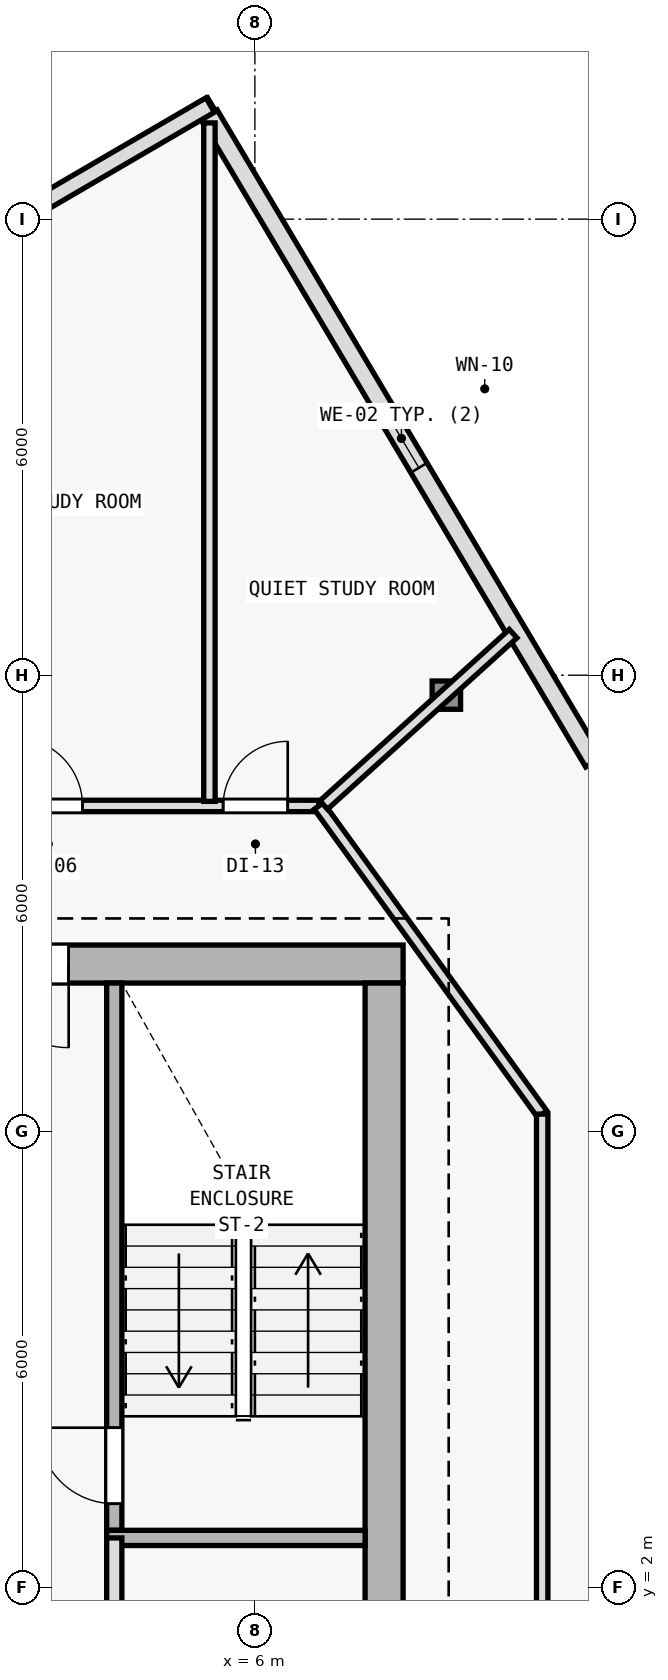
"""IFC4 building model, lengths in metres.
Left out: names, types, materials, properties, quantities, classifications, styles, units other than length and angle.
Written with IfcOpenShell. Run it as: python <this file> out.ifc"""

import sys

from ifc_helpers import new_model, si_unit, direction, frame, frame_2d, origin, origin_2d, place, context, subcontext, project, spatial, rectangle, i_section, extrude, element, fill, save


model = new_model("IFC4")
c1 = context("Model", 3, precision=1e-05, world=origin(), true_north=direction((0.0, 1.0)))
c2 = subcontext(c1, "Body", "Model", "MODEL_VIEW")
j1 = project(units=[si_unit("LENGTHUNIT", "METRE"), si_unit("PLANEANGLEUNIT", "RADIAN")], contexts=[c1])
p1 = place(None, origin())
s1 = spatial("IfcSite", under=j1, at=p1, CompositionType="ELEMENT")
p2 = place(p1, origin())
s2 = spatial("IfcBuilding", under=s1, at=p2, CompositionType="ELEMENT")
p3 = place(p2, frame((0.0, 0.0, 234.3)))
s3 = spatial("IfcBuildingStorey", under=s2, at=p3, CompositionType="ELEMENT", Elevation=234.3)
p4 = place(p3, frame((7.7, 10.2, 0.0), z_axis=(0.0, 0.0, 1.0), x_axis=(1.0, 0.0, 0.0)))
e1 = element("IfcColumn", 1, at=p4, inside=s3, PredefinedType="COLUMN", context=c2, shape_type="SweptSolid", body=[
    extrude(i_section(OverallWidth=0.398, OverallDepth=0.387, WebThickness=0.013, FlangeThickness=0.022, FilletRadius=0.015, at=origin_2d()), origin(), (0.0, 0.0, 1.0), 3.6),
])
p5 = place(p3, frame((8.519, 13.738, 0.005), z_axis=(-0.011699044583, -0.00258467264, 0.999928223336), x_axis=(0.215728093413, -0.976453475447, 0.0)))
e2 = element("IfcColumn", 2, at=p5, inside=s3, PredefinedType="COLUMN", context=c2, shape_type="SweptSolid", body=[
    extrude(i_section(OverallWidth=0.374, OverallDepth=0.372, WebThickness=0.012, FlangeThickness=0.02, FilletRadius=0.015, at=origin_2d()), origin(), (0.0, 0.0, 1.0), 3.589),
])
p6 = place(p3, frame((5.396, 21.375, 0.0), z_axis=(0.0, 0.0, 1.0), x_axis=(0.511082771111, -0.85953150092, 0.0)))
e3 = element("IfcWall", 3, at=p6, inside=s3, PredefinedType="SOLIDWALL", context=c2, shape_type="SweptSolid", body=[
    extrude(rectangle(XDim=9.911, YDim=0.25, at=frame_2d((4.955, 0.0))), origin(), (0.0, 0.0, 1.0), 3.35),
])
p7 = place(p6, frame((4.505, 0.0, 0.62)))
e4 = element("IfcOpeningElement", 4, at=p7, cuts=e3, PredefinedType="OPENING", context=c2, shape_type="SweptSolid", body=[
    extrude(rectangle(XDim=0.9, YDim=1.6, at=frame_2d((0.45, 0.8))), frame((0.0, 0.135, 0.0), z_axis=(0.0, -1.0, 0.0), x_axis=(1.0, 0.0, 0.0)), (0.0, 0.0, 1.0), 0.27),
])
p8 = place(p3, frame((1.884, 19.445, 0.0), z_axis=(0.0, 0.0, 1.0), x_axis=(0.863969645804, 0.50354389196, 0.0)))
e5 = element("IfcWall", 5, at=p8, inside=s3, PredefinedType="SOLIDWALL", context=c2, shape_type="SweptSolid", body=[
    extrude(rectangle(XDim=4.084, YDim=0.22, at=frame_2d((2.042, 0.0))), origin(), (0.0, 0.0, 1.0), 3.35),
])
p9 = place(p3, frame((7.95, 10.2, 0.0), z_axis=(0.0, 0.0, 1.0), x_axis=(-1.0, 0.0, 0.0)))
e6 = element("IfcWall", 6, at=p9, inside=s3, PredefinedType="SHEAR", context=c2, shape_type="SweptSolid", body=[
    extrude(rectangle(XDim=15.9, YDim=0.5, at=frame_2d((7.95, 0.0))), origin(), (0.0, 0.0, 1.0), 3.35),
])
p10 = place(p9, frame((4.4, 0.0, 0.0)))
e7 = element("IfcOpeningElement", 7, at=p10, cuts=e6, PredefinedType="OPENING", context=c2, shape_type="SweptSolid", body=[
    extrude(rectangle(XDim=1.1, YDim=2.15, at=frame_2d((0.55, 1.075))), frame((0.0, 0.26, 0.0), z_axis=(0.0, -1.0, 0.0), x_axis=(1.0, 0.0, 0.0)), (0.0, 0.0, 1.0), 0.52),
])
p11 = place(p3, frame((7.7, 9.95, 0.0), z_axis=(0.0, 0.0, 1.0), x_axis=(0.0, -1.0, 0.0)))
e8 = element("IfcWall", 8, at=p11, inside=s3, PredefinedType="SHEAR", context=c2, shape_type="SweptSolid", body=[
    extrude(rectangle(XDim=19.1, YDim=0.5, at=frame_2d((9.55, 0.0))), origin(), (0.0, 0.0, 1.0), 3.35),
])
p12 = place(p3, frame((4.15, 2.75, 0.0), z_axis=(0.0, 0.0, 1.0), x_axis=(0.0, 1.0, 0.0)))
e9 = element("IfcWall", 9, at=p12, inside=s3, PredefinedType="SOLIDWALL", context=c2, shape_type="SweptSolid", body=[
    extrude(rectangle(XDim=7.2, YDim=0.2, at=frame_2d((3.6, 0.0))), origin(), (0.0, 0.0, 1.0), 3.35),
])
p13 = place(p12, frame((0.35, 0.0, 0.0)))
e10 = element("IfcOpeningElement", 10, at=p13, cuts=e9, PredefinedType="OPENING", context=c2, shape_type="SweptSolid", body=[
    extrude(rectangle(XDim=1.0, YDim=2.15, at=frame_2d((0.5, 1.075))), frame((0.0, 0.11, 0.0), z_axis=(0.0, -1.0, 0.0), x_axis=(1.0, 0.0, 0.0)), (0.0, 0.0, 1.0), 0.22),
])
p14 = place(p3, frame((4.05, 2.65, 0.0), z_axis=(0.0, 0.0, 1.0), x_axis=(1.0, 0.0, 0.0)))
e11 = element("IfcWall", 11, at=p14, inside=s3, PredefinedType="SOLIDWALL", context=c2, shape_type="SweptSolid", body=[
    extrude(rectangle(XDim=3.4, YDim=0.2, at=frame_2d((1.7, 0.0))), origin(), (0.0, 0.0, 1.0), 3.35),
])
p15 = place(p3, frame((4.15, -6.05, 0.0), z_axis=(0.0, 0.0, 1.0), x_axis=(0.0, 1.0, 0.0)))
e12 = element("IfcWall", 12, at=p15, inside=s3, PredefinedType="SOLIDWALL", context=c2, shape_type="SweptSolid", body=[
    extrude(rectangle(XDim=8.7, YDim=0.2, at=frame_2d((4.35, 0.0))), origin(), (0.0, 0.0, 1.0), 3.35),
])
p16 = place(p15, frame((3.6, 0.0, 0.0)))
e13 = element("IfcOpeningElement", 13, at=p16, cuts=e12, PredefinedType="OPENING", context=c2, shape_type="SweptSolid", body=[
    extrude(rectangle(XDim=0.95, YDim=2.1, at=frame_2d((0.475, 1.05))), frame((0.0, 0.11, 0.0), z_axis=(0.0, -1.0, 0.0), x_axis=(1.0, 0.0, 0.0)), (0.0, 0.0, 1.0), 0.22),
])
p17 = place(p3, frame((-6.841, 12.28, 0.0), z_axis=(0.0, 0.0, 1.0), x_axis=(1.0, 0.0, 0.0)))
e14 = element("IfcWall", 14, at=p17, inside=s3, PredefinedType="PARTITIONING", context=c2, shape_type="SweptSolid", body=[
    extrude(rectangle(XDim=13.682, YDim=0.15, at=frame_2d((6.841, 0.0))), origin(), (0.0, 0.0, 1.0), 2.975),
])
p18 = place(p17, frame((12.423, 0.0, 0.0)))
e15 = element("IfcOpeningElement", 15, at=p18, cuts=e14, PredefinedType="OPENING", context=c2, shape_type="SweptSolid", body=[
    extrude(rectangle(XDim=0.85, YDim=2.1, at=frame_2d((0.425, 1.05))), frame((0.0, 0.085, 0.0), z_axis=(0.0, -1.0, 0.0), x_axis=(1.0, 0.0, 0.0)), (0.0, 0.0, 1.0), 0.17),
])
p19 = place(p17, frame((9.674, 0.0, 0.0)))
e16 = element("IfcOpeningElement", 16, at=p19, cuts=e14, PredefinedType="OPENING", context=c2, shape_type="SweptSolid", body=[
    extrude(rectangle(XDim=0.9, YDim=2.1, at=frame_2d((0.45, 1.05))), frame((0.0, 0.085, 0.0), z_axis=(0.0, -1.0, 0.0), x_axis=(1.0, 0.0, 0.0)), (0.0, 0.0, 1.0), 0.17),
])
p20 = place(p17, frame((5.941, 0.0, 0.0)))
e17 = element("IfcOpeningElement", 17, at=p20, cuts=e14, PredefinedType="OPENING", context=c2, shape_type="SweptSolid", body=[
    extrude(rectangle(XDim=0.9, YDim=2.1, at=frame_2d((0.45, 1.05))), frame((0.0, 0.085, 0.0), z_axis=(0.0, -1.0, 0.0), x_axis=(1.0, 0.0, 0.0)), (0.0, 0.0, 1.0), 0.17),
])
p21 = place(p17, frame((2.258, 0.0, 0.0)))
e18 = element("IfcOpeningElement", 18, at=p21, cuts=e14, PredefinedType="OPENING", context=c2, shape_type="SweptSolid", body=[
    extrude(rectangle(XDim=0.9, YDim=2.1, at=frame_2d((0.45, 1.05))), frame((0.0, 0.085, 0.0), z_axis=(0.0, -1.0, 0.0), x_axis=(1.0, 0.0, 0.0)), (0.0, 0.0, 1.0), 0.17),
])
p22 = place(p3, frame((6.841, 12.28, 0.0), z_axis=(0.0, 0.0, 1.0), x_axis=(0.586956386413, -0.809618552436, 0.0)))
e19 = element("IfcWall", 19, at=p22, inside=s3, PredefinedType="PARTITIONING", context=c2, shape_type="SweptSolid", body=[
    extrude(rectangle(XDim=5.008, YDim=0.15, at=frame_2d((2.504, 0.0))), origin(), (0.0, 0.0, 1.0), 2.995),
])
p23 = place(p3, frame((9.78, 8.226, 0.0), z_axis=(0.0, 0.0, 1.0), x_axis=(0.0, -1.0, 0.0)))
e20 = element("IfcWall", 20, at=p23, inside=s3, PredefinedType="PARTITIONING", context=c2, shape_type="SweptSolid", body=[
    extrude(rectangle(XDim=19.706, YDim=0.15, at=frame_2d((9.853, 0.0))), origin(), (0.0, 0.0, 1.0), 2.875),
])
p24 = place(p23, frame((9.403, 0.0, 0.0)))
e21 = element("IfcOpeningElement", 21, at=p24, cuts=e20, PredefinedType="OPENING", context=c2, shape_type="SweptSolid", body=[
    extrude(rectangle(XDim=0.9, YDim=2.1, at=frame_2d((0.45, 1.05))), frame((0.0, 0.085, 0.0), z_axis=(0.0, -1.0, 0.0), x_axis=(1.0, 0.0, 0.0)), (0.0, 0.0, 1.0), 0.17),
])
p25 = place(p3, frame((6.905, 12.292, 0.0), z_axis=(0.0, 0.0, 1.0), x_axis=(0.741738834203, 0.670688826383, 0.0)))
e22 = element("IfcWall", 22, at=p25, inside=s3, PredefinedType="PARTITIONING", context=c2, shape_type="SweptSolid", body=[
    extrude(rectangle(XDim=3.361, YDim=0.15, at=frame_2d((1.68, 0.0))), origin(), (0.0, 0.0, 1.0), 2.975),
])
p26 = place(p3, frame((5.402, 12.34, 0.0), z_axis=(0.0, 0.0, 1.0), x_axis=(0.0, 1.0, 0.0)))
e23 = element("IfcWall", 23, at=p26, inside=s3, PredefinedType="PARTITIONING", context=c2, shape_type="SweptSolid", body=[
    extrude(rectangle(XDim=8.926, YDim=0.15, at=frame_2d((4.463, 0.0))), origin(), (0.0, 0.0, 1.0), 2.975),
])
p27 = place(p7, origin())
e24 = element("IfcWindow", 24, at=p27, inside=s3, PartitioningType="SINGLE_PANEL", PredefinedType="WINDOW", context=c2, shape_type="SweptSolid", body=[
    extrude(rectangle(XDim=0.9, YDim=1.6, at=frame_2d((0.45, 0.8))), frame((0.0, 0.03, 0.0), z_axis=(0.0, -1.0, 0.0), x_axis=(1.0, 0.0, 0.0)), (0.0, 0.0, 1.0), 0.06),
])
fill(e4, e24)
p28 = place(p10, origin())
e25 = element("IfcDoor", 25, at=p28, inside=s3, OperationType="SINGLE_SWING_LEFT", PredefinedType="DOOR", context=c2, shape_type="SweptSolid", body=[
    extrude(rectangle(XDim=1.1, YDim=2.15, at=frame_2d((0.55, 1.075))), frame((0.0, 0.025, 0.0), z_axis=(0.0, -1.0, 0.0), x_axis=(1.0, 0.0, 0.0)), (0.0, 0.0, 1.0), 0.05),
])
fill(e7, e25)
p29 = place(p13, origin())
e26 = element("IfcDoor", 26, at=p29, inside=s3, OperationType="SINGLE_SWING_RIGHT", PredefinedType="DOOR", context=c2, shape_type="SweptSolid", body=[
    extrude(rectangle(XDim=1.0, YDim=2.15, at=frame_2d((0.5, 1.075))), frame((0.0, 0.025, 0.0), z_axis=(0.0, -1.0, 0.0), x_axis=(1.0, 0.0, 0.0)), (0.0, 0.0, 1.0), 0.05),
])
fill(e10, e26)
p30 = place(p18, origin())
e27 = element("IfcDoor", 27, at=p30, inside=s3, OperationType="SINGLE_SWING_RIGHT", PredefinedType="DOOR", context=c2, shape_type="SweptSolid", body=[
    extrude(rectangle(XDim=0.85, YDim=2.1, at=frame_2d((0.425, 1.05))), frame((0.0, 0.025, 0.0), z_axis=(0.0, -1.0, 0.0), x_axis=(1.0, 0.0, 0.0)), (0.0, 0.0, 1.0), 0.05),
])
fill(e15, e27)
p31 = place(p19, origin())
e28 = element("IfcDoor", 28, at=p31, inside=s3, OperationType="SINGLE_SWING_LEFT", PredefinedType="DOOR", context=c2, shape_type="SweptSolid", body=[
    extrude(rectangle(XDim=0.9, YDim=2.1, at=frame_2d((0.45, 1.05))), frame((0.0, 0.025, 0.0), z_axis=(0.0, -1.0, 0.0), x_axis=(1.0, 0.0, 0.0)), (0.0, 0.0, 1.0), 0.05),
])
fill(e16, e28)
save(model, sys.argv[1])
